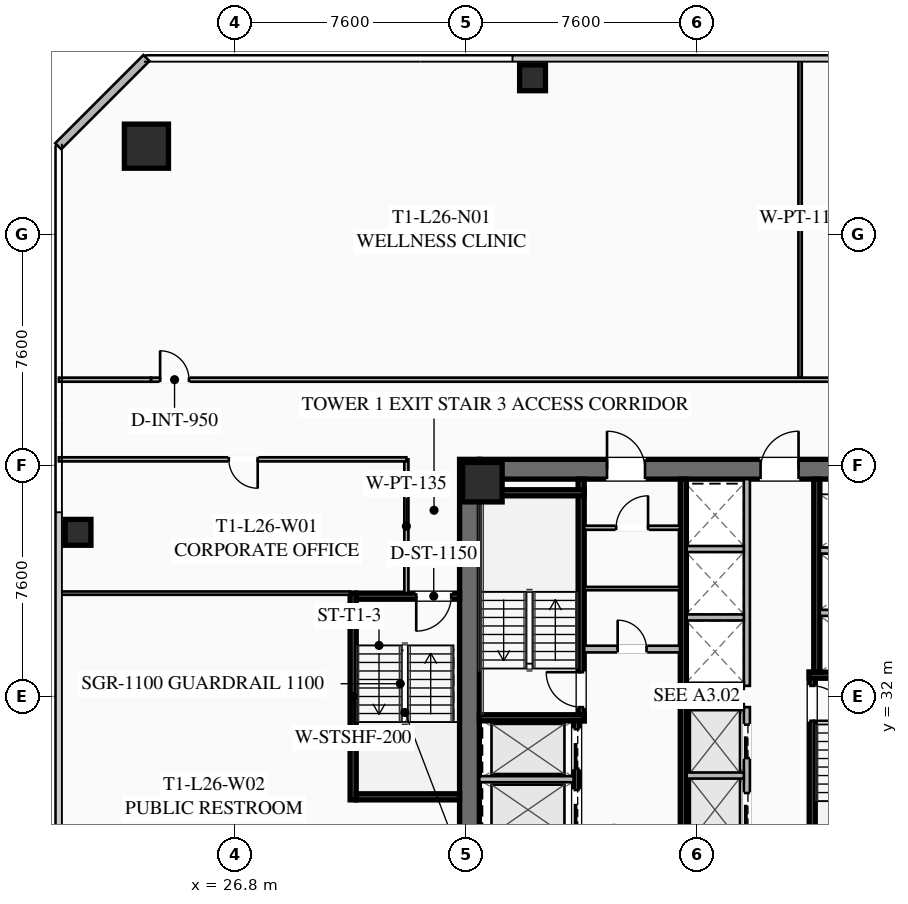
"""IFC4 building model, lengths in metres.
Left out: names, types, materials, properties, quantities, classifications, styles, units other than length and angle.
Written with IfcOpenShell. Run it as: python <this file> out.ifc"""

import sys

from ifc_helpers import new_model, si_unit, direction, frame, frame_2d, origin, origin_2d, place, context, subcontext, project, spatial, rectangle, hollow_rectangle, extrude, element, fill, save


model = new_model("IFC4")
c1 = context("Model", 3, precision=1e-05, world=origin(), true_north=direction((0.0, 1.0)))
c2 = subcontext(c1, "Body", "Model", "MODEL_VIEW")
j1 = project(units=[si_unit("LENGTHUNIT", "METRE"), si_unit("PLANEANGLEUNIT", "RADIAN")], contexts=[c1])
p1 = place(None, origin())
s1 = spatial("IfcSite", under=j1, at=p1, CompositionType="ELEMENT")
p2 = place(p1, origin())
s2 = spatial("IfcBuilding", under=s1, at=p2, CompositionType="ELEMENT")
p3 = place(p2, frame((0.0, 0.0, 99.15)))
s3 = spatial("IfcBuildingStorey", under=s2, at=p3, CompositionType="ELEMENT", Elevation=99.15)
p4 = place(p3, frame((34.525, 24.2, 0.0), z_axis=(0.0, 0.0, 1.0), x_axis=(0.0, 1.0, 0.0)))
e1 = element("IfcWall", 1, at=p4, inside=s3, PredefinedType="SHEAR", context=c2, shape_type="SweptSolid", body=[
    extrude(rectangle(XDim=15.6, YDim=0.65, at=frame_2d((7.8, 0.0))), origin(), (0.0, 0.0, 1.0), 3.55),
])
p5 = place(p3, frame((34.85, 39.475, 0.0), z_axis=(0.0, 0.0, 1.0), x_axis=(1.0, 0.0, 0.0)))
e2 = element("IfcWall", 2, at=p5, inside=s3, PredefinedType="SHEAR", context=c2, shape_type="SweptSolid", body=[
    extrude(rectangle(XDim=14.3, YDim=0.65, at=frame_2d((7.15, 0.0))), origin(), (0.0, 0.0, 1.0), 3.55),
])
p6 = place(p5, frame((4.2, 0.0, 0.0)))
e3 = element("IfcOpeningElement", 3, at=p6, cuts=e2, PredefinedType="OPENING", context=c2, shape_type="SweptSolid", body=[
    extrude(rectangle(XDim=1.25, YDim=2.25, at=frame_2d((0.625, 1.125))), frame((0.0, 0.335, 0.0), z_axis=(0.0, -1.0, 0.0), x_axis=(1.0, 0.0, 0.0)), (0.0, 0.0, 1.0), 0.67),
])
p7 = place(p5, frame((9.25, 0.0, 0.0)))
e4 = element("IfcOpeningElement", 4, at=p7, cuts=e2, PredefinedType="OPENING", context=c2, shape_type="SweptSolid", body=[
    extrude(rectangle(XDim=1.25, YDim=2.25, at=frame_2d((0.625, 1.125))), frame((0.0, 0.335, 0.0), z_axis=(0.0, -1.0, 0.0), x_axis=(1.0, 0.0, 0.0)), (0.0, 0.0, 1.0), 0.67),
])
p8 = place(p3, frame((34.95, 39.05, 0.0), z_axis=(0.0, 0.0, 1.0), x_axis=(1.0, 0.0, 0.0)))
e5 = element("IfcColumn", 5, at=p8, inside=s3, PredefinedType="COLUMN", context=c2, shape_type="SweptSolid", body=[
    extrude(hollow_rectangle(XDim=1.3, YDim=1.3, WallThickness=0.05, at=origin_2d()), origin(), (0.0, 0.0, 1.0), 3.35),
])
p9 = place(p3, frame((23.9, 50.1, 0.0), z_axis=(0.0, 0.0, 1.0), x_axis=(1.0, 0.0, 0.0)))
e6 = element("IfcColumn", 6, at=p9, inside=s3, PredefinedType="COLUMN", context=c2, shape_type="SweptSolid", body=[
    extrude(hollow_rectangle(XDim=1.45, YDim=1.45, WallThickness=0.055, at=origin_2d()), origin(), (0.0, 0.0, 1.0), 3.35),
])
for number, where, z_axis, x_axis in (
    (7, (36.6, 52.35, 0.0), (0.0, 0.0, 1.0), (1.0, 0.0, 0.0)),
    (8, (21.65, 37.4, 0.0), (0.0, 0.0, 1.0), (1.0, 0.0, 0.0)),
):
    element("IfcColumn", number, at=place(p3, frame(where, z_axis=z_axis, x_axis=x_axis)), inside=s3, PredefinedType="COLUMN", context=c2, shape_type="SweptSolid", body=[
        extrude(hollow_rectangle(XDim=0.85, YDim=0.85, WallThickness=0.035, at=origin_2d()), origin(), (0.0, 0.0, 1.0), 3.35),
    ])
p10 = place(p3, frame((21.0, 50.1, 0.0), z_axis=(0.0, 0.0, 1.0), x_axis=(0.707106781187, 0.707106781187, 0.0)))
e9 = element("IfcWall", 9, at=p10, inside=s3, PredefinedType="SOLIDWALL", context=c2, shape_type="SweptSolid", body=[
    extrude(rectangle(XDim=4.101, YDim=0.28, at=frame_2d((2.051, 0.0))), origin(), (0.0, 0.0, 1.0), 3.35),
])
p11 = place(p3, frame((38.2, 31.2, 0.0), z_axis=(0.0, 0.0, 1.0), x_axis=(0.0, 1.0, 0.0)))
e10 = element("IfcWall", 10, at=p11, inside=s3, PredefinedType="SHEAR", context=c2, shape_type="SweptSolid", body=[
    extrude(rectangle(XDim=7.95, YDim=0.2, at=frame_2d((3.975, 0.0))), origin(), (0.0, 0.0, 1.0), 3.35),
])
p12 = place(p11, frame((0.45, 0.0, 0.0)))
e11 = element("IfcOpeningElement", 11, at=p12, cuts=e10, PredefinedType="OPENING", context=c2, shape_type="SweptSolid", body=[
    extrude(rectangle(XDim=1.15, YDim=2.2, at=frame_2d((0.575, 1.1))), frame((0.0, 0.11, 0.0), z_axis=(0.0, -1.0, 0.0), x_axis=(1.0, 0.0, 0.0)), (0.0, 0.0, 1.0), 0.22),
])
for number, where, z_axis, x_axis in (
    (12, (34.85, 31.3, 0.0), (0.0, 0.0, 1.0), (1.0, 0.0, 0.0)),
    (13, (34.85, 38.7, 0.0), (0.0, 0.0, 1.0), (1.0, 0.0, 0.0)),
):
    element("IfcWall", number, at=place(p3, frame(where, z_axis=z_axis, x_axis=x_axis)), inside=s3, PredefinedType="SHEAR", context=c2, shape_type="SweptSolid", body=[
        extrude(rectangle(XDim=3.45, YDim=0.2, at=frame_2d((1.725, 0.0))), origin(), (0.0, 0.0, 1.0), 3.35),
    ])
p13 = place(p3, frame((45.8, 32.8, 0.0), z_axis=(0.0, 0.0, 1.0), x_axis=(0.0, -1.0, 0.0)))
e14 = element("IfcWall", 14, at=p13, inside=s3, PredefinedType="SHEAR", context=c2, shape_type="SweptSolid", body=[
    extrude(rectangle(XDim=7.95, YDim=0.2, at=frame_2d((3.975, 0.0))), origin(), (0.0, 0.0, 1.0), 3.35),
])
p14 = place(p13, frame((0.45, 0.0, 0.0)))
e15 = element("IfcOpeningElement", 15, at=p14, cuts=e14, PredefinedType="OPENING", context=c2, shape_type="SweptSolid", body=[
    extrude(rectangle(XDim=1.15, YDim=2.2, at=frame_2d((0.575, 1.1))), frame((0.0, 0.11, 0.0), z_axis=(0.0, -1.0, 0.0), x_axis=(1.0, 0.0, 0.0)), (0.0, 0.0, 1.0), 0.22),
])
p15 = place(p3, frame((45.7, 32.7, 0.0), z_axis=(0.0, 0.0, 1.0), x_axis=(1.0, 0.0, 0.0)))
e16 = element("IfcWall", 16, at=p15, inside=s3, PredefinedType="SHEAR", context=c2, shape_type="SweptSolid", body=[
    extrude(rectangle(XDim=3.45, YDim=0.2, at=frame_2d((1.725, 0.0))), origin(), (0.0, 0.0, 1.0), 3.35),
])
p16 = place(p3, frame((41.56, 24.85, 0.0), z_axis=(0.0, 0.0, 1.0), x_axis=(0.0, 1.0, 0.0)))
e17 = element("IfcWall", 17, at=p16, inside=s3, PredefinedType="SHEAR", context=c2, shape_type="SweptSolid", body=[
    extrude(rectangle(XDim=14.3, YDim=0.2, at=frame_2d((7.15, 0.0))), origin(), (0.0, 0.0, 1.0), 3.35),
])
p17 = place(p3, frame((38.3, 33.56, 0.0), z_axis=(0.0, 0.0, 1.0), x_axis=(1.0, 0.0, 0.0)))
e18 = element("IfcWall", 18, at=p17, inside=s3, PredefinedType="SOLIDWALL", context=c2, shape_type="SweptSolid", body=[
    extrude(rectangle(XDim=3.15, YDim=0.22, at=frame_2d((1.575, 0.0))), origin(), (0.0, 0.0, 1.0), 2.703),
])
p18 = place(p17, frame((1.1, 0.0, 0.0)))
e19 = element("IfcOpeningElement", 19, at=p18, cuts=e18, PredefinedType="OPENING", context=c2, shape_type="SweptSolid", body=[
    extrude(rectangle(XDim=0.95, YDim=2.05, at=frame_2d((0.475, 1.025))), frame((0.0, 0.12, 0.0), z_axis=(0.0, -1.0, 0.0), x_axis=(1.0, 0.0, 0.0)), (0.0, 0.0, 1.0), 0.24),
])
p19 = place(p3, frame((38.05, 24.85, 0.0), z_axis=(0.0, 0.0, 1.0), x_axis=(0.0, 1.0, 0.0)))
e20 = element("IfcWall", 20, at=p19, inside=s3, PredefinedType="SHEAR", context=c2, shape_type="SweptSolid", body=[
    extrude(rectangle(XDim=6.35, YDim=0.2, at=frame_2d((3.175, 0.0))), origin(), (0.0, 0.0, 1.0), 3.35),
])
p20 = place(p19, frame((4.775, 0.0, 0.0)))
e21 = element("IfcOpeningElement", 21, at=p20, cuts=e20, PredefinedType="OPENING", context=c2, shape_type="SweptSolid", body=[
    extrude(rectangle(XDim=1.3, YDim=2.25, at=frame_2d((0.65, 1.125))), frame((0.0, 0.11, 0.0), z_axis=(0.0, -1.0, 0.0), x_axis=(1.0, 0.0, 0.0)), (0.0, 0.0, 1.0), 0.22),
])
p21 = place(p19, frame((2.775, 0.0, 0.0)))
e22 = element("IfcOpeningElement", 22, at=p21, cuts=e20, PredefinedType="OPENING", context=c2, shape_type="SweptSolid", body=[
    extrude(rectangle(XDim=1.3, YDim=2.25, at=frame_2d((0.65, 1.125))), frame((0.0, 0.11, 0.0), z_axis=(0.0, -1.0, 0.0), x_axis=(1.0, 0.0, 0.0)), (0.0, 0.0, 1.0), 0.22),
])
p22 = place(p19, frame((0.575, 0.0, 0.0)))
e23 = element("IfcOpeningElement", 23, at=p22, cuts=e20, PredefinedType="OPENING", context=c2, shape_type="SweptSolid", body=[
    extrude(rectangle(XDim=1.3, YDim=2.25, at=frame_2d((0.65, 1.125))), frame((0.0, 0.11, 0.0), z_axis=(0.0, -1.0, 0.0), x_axis=(1.0, 0.0, 0.0)), (0.0, 0.0, 1.0), 0.22),
])
p23 = place(p3, frame((34.85, 29.28, 0.0), z_axis=(0.0, 0.0, 1.0), x_axis=(1.0, 0.0, 0.0)))
e24 = element("IfcWall", 24, at=p23, inside=s3, PredefinedType="SOLIDWALL", context=c2, shape_type="SweptSolid", body=[
    extrude(rectangle(XDim=3.1, YDim=0.2, at=frame_2d((1.55, 0.0))), origin(), (0.0, 0.0, 1.0), 3.35),
])
p24 = place(p3, frame((45.95, 39.15, 0.0), z_axis=(0.0, 0.0, 1.0), x_axis=(0.0, -1.0, 0.0)))
e25 = element("IfcWall", 25, at=p24, inside=s3, PredefinedType="SHEAR", context=c2, shape_type="SweptSolid", body=[
    extrude(rectangle(XDim=6.35, YDim=0.2, at=frame_2d((3.175, 0.0))), origin(), (0.0, 0.0, 1.0), 3.35),
])
for number, where, z_axis, x_axis in (
    (26, (46.05, 34.75, 0.0), (0.0, 0.0, 1.0), (1.0, 0.0, 0.0)),
    (27, (46.05, 36.8, 0.0), (0.0, 0.0, 1.0), (1.0, 0.0, 0.0)),
):
    element("IfcWall", number, at=place(p3, frame(where, z_axis=z_axis, x_axis=x_axis)), inside=s3, PredefinedType="SOLIDWALL", context=c2, shape_type="SweptSolid", body=[
        extrude(rectangle(XDim=3.1, YDim=0.2, at=frame_2d((1.55, 0.0))), origin(), (0.0, 0.0, 1.0), 3.35),
    ])
p25 = place(p3, frame((38.3, 37.55, 0.0), z_axis=(0.0, 0.0, 1.0), x_axis=(1.0, 0.0, 0.0)))
e28 = element("IfcWall", 28, at=p25, inside=s3, PredefinedType="PARTITIONING", context=c2, shape_type="SweptSolid", body=[
    extrude(rectangle(XDim=3.15, YDim=0.135, at=frame_2d((1.575, 0.0))), origin(), (0.0, 0.0, 1.0), 2.703),
])
p26 = place(p25, frame((1.05, 0.0, 0.0)))
e29 = element("IfcOpeningElement", 29, at=p26, cuts=e28, PredefinedType="OPENING", context=c2, shape_type="SweptSolid", body=[
    extrude(rectangle(XDim=1.05, YDim=2.2, at=frame_2d((0.525, 1.1))), frame((0.0, 0.077, 0.0), z_axis=(0.0, -1.0, 0.0), x_axis=(1.0, 0.0, 0.0)), (0.0, 0.0, 1.0), 0.155),
])
p27 = place(p3, frame((38.3, 35.55, 0.0), z_axis=(0.0, 0.0, 1.0), x_axis=(1.0, 0.0, 0.0)))
e30 = element("IfcWall", 30, at=p27, inside=s3, PredefinedType="PARTITIONING", context=c2, shape_type="SweptSolid", body=[
    extrude(rectangle(XDim=3.15, YDim=0.11, at=frame_2d((1.575, 0.0))), origin(), (0.0, 0.0, 1.0), 2.703),
])
p28 = place(p3, frame((43.65, 24.85, 0.0), z_axis=(0.0, 0.0, 1.0), x_axis=(0.0, 1.0, 0.0)))
e31 = element("IfcWall", 31, at=p28, inside=s3, PredefinedType="SOLIDWALL", context=c2, shape_type="SweptSolid", body=[
    extrude(rectangle(XDim=6.8, YDim=0.2, at=frame_2d((3.4, 0.0))), origin(), (0.0, 0.0, 1.0), 3.35),
])
p29 = place(p28, frame((0.625, 0.0, 0.0)))
e32 = element("IfcOpeningElement", 32, at=p29, cuts=e31, PredefinedType="OPENING", context=c2, shape_type="SweptSolid", body=[
    extrude(rectangle(XDim=1.1, YDim=2.2, at=frame_2d((0.55, 1.1))), frame((0.0, 0.11, 0.0), z_axis=(0.0, -1.0, 0.0), x_axis=(1.0, 0.0, 0.0)), (0.0, 0.0, 1.0), 0.22),
])
p30 = place(p28, frame((2.875, 0.0, 0.0)))
e33 = element("IfcOpeningElement", 33, at=p30, cuts=e31, PredefinedType="OPENING", context=c2, shape_type="SweptSolid", body=[
    extrude(rectangle(XDim=1.1, YDim=2.2, at=frame_2d((0.55, 1.1))), frame((0.0, 0.11, 0.0), z_axis=(0.0, -1.0, 0.0), x_axis=(1.0, 0.0, 0.0)), (0.0, 0.0, 1.0), 0.22),
])
p31 = place(p28, frame((5.125, 0.0, 0.0)))
e34 = element("IfcOpeningElement", 34, at=p31, cuts=e31, PredefinedType="OPENING", context=c2, shape_type="SweptSolid", body=[
    extrude(rectangle(XDim=1.1, YDim=2.2, at=frame_2d((0.55, 1.1))), frame((0.0, 0.11, 0.0), z_axis=(0.0, -1.0, 0.0), x_axis=(1.0, 0.0, 0.0)), (0.0, 0.0, 1.0), 0.22),
])
for number, where, z_axis, x_axis in (
    (35, (41.67, 29.4, 0.0), (0.0, 0.0, 1.0), (1.0, 0.0, 0.0)),
    (36, (41.67, 31.65, 0.0), (0.0, 0.0, 1.0), (1.0, 0.0, 0.0)),
):
    element("IfcWall", number, at=place(p3, frame(where, z_axis=z_axis, x_axis=x_axis)), inside=s3, PredefinedType="SOLIDWALL", context=c2, shape_type="SweptSolid", body=[
        extrude(rectangle(XDim=1.88, YDim=0.2, at=frame_2d((0.94, 0.0))), origin(), (0.0, 0.0, 1.0), 3.35),
    ])
p32 = place(p3, frame((43.65, 32.35, 0.0), z_axis=(0.0, 0.0, 1.0), x_axis=(0.0, 1.0, 0.0)))
e37 = element("IfcWall", 37, at=p32, inside=s3, PredefinedType="SOLIDWALL", context=c2, shape_type="SweptSolid", body=[
    extrude(rectangle(XDim=6.8, YDim=0.2, at=frame_2d((3.4, 0.0))), origin(), (0.0, 0.0, 1.0), 3.35),
])
for number, where, z_axis, x_axis in (
    (38, (41.67, 32.35, 0.0), (0.0, 0.0, 1.0), (1.0, 0.0, 0.0)),
    (39, (41.67, 34.6, 0.0), (0.0, 0.0, 1.0), (1.0, 0.0, 0.0)),
    (40, (41.67, 36.85, 0.0), (0.0, 0.0, 1.0), (1.0, 0.0, 0.0)),
):
    element("IfcWall", number, at=place(p3, frame(where, z_axis=z_axis, x_axis=x_axis)), inside=s3, PredefinedType="SOLIDWALL", context=c2, shape_type="SweptSolid", body=[
        extrude(rectangle(XDim=1.88, YDim=0.2, at=frame_2d((0.94, 0.0))), origin(), (0.0, 0.0, 1.0), 3.35),
    ])
p33 = place(p3, frame((30.7, 28.6, 0.0), z_axis=(0.0, 0.0, 1.0), x_axis=(0.0, 1.0, 0.0)))
e41 = element("IfcWall", 41, at=p33, inside=s3, PredefinedType="SHEAR", context=c2, shape_type="SweptSolid", body=[
    extrude(rectangle(XDim=6.8, YDim=0.2, at=frame_2d((3.4, 0.0))), origin(), (0.0, 0.0, 1.0), 3.35),
])
p34 = place(p3, frame((34.2, 35.3, 0.0), z_axis=(0.0, 0.0, 1.0), x_axis=(-1.0, 0.0, 0.0)))
e42 = element("IfcWall", 42, at=p34, inside=s3, PredefinedType="SHEAR", context=c2, shape_type="SweptSolid", body=[
    extrude(rectangle(XDim=3.4, YDim=0.2, at=frame_2d((1.7, 0.0))), origin(), (0.0, 0.0, 1.0), 3.35),
])
p35 = place(p34, frame((0.275, 0.0, 0.0)))
e43 = element("IfcOpeningElement", 43, at=p35, cuts=e42, PredefinedType="OPENING", context=c2, shape_type="SweptSolid", body=[
    extrude(rectangle(XDim=1.15, YDim=2.2, at=frame_2d((0.575, 1.1))), frame((0.0, 0.11, 0.0), z_axis=(0.0, -1.0, 0.0), x_axis=(1.0, 0.0, 0.0)), (0.0, 0.0, 1.0), 0.22),
])
p36 = place(p3, frame((30.8, 28.7, 0.0), z_axis=(0.0, 0.0, 1.0), x_axis=(1.0, 0.0, 0.0)))
e44 = element("IfcWall", 44, at=p36, inside=s3, PredefinedType="SHEAR", context=c2, shape_type="SweptSolid", body=[
    extrude(rectangle(XDim=3.4, YDim=0.2, at=frame_2d((1.7, 0.0))), origin(), (0.0, 0.0, 1.0), 3.35),
])
p37 = place(p3, frame((32.45, 35.4, 0.0), z_axis=(0.0, 0.0, 1.0), x_axis=(0.0, 1.0, 0.0)))
e45 = element("IfcWall", 45, at=p37, inside=s3, PredefinedType="PARTITIONING", context=c2, shape_type="SweptSolid", body=[
    extrude(rectangle(XDim=4.4, YDim=0.135, at=frame_2d((2.2, 0.0))), origin(), (0.0, 0.0, 1.0), 2.703),
])
p38 = place(p3, frame((24.05, 42.42, 0.0), z_axis=(0.0, 0.0, 1.0), x_axis=(1.0, 0.0, 0.0)))
e46 = element("IfcWall", 46, at=p38, inside=s3, PredefinedType="PARTITIONING", context=c2, shape_type="SweptSolid", body=[
    extrude(rectangle(XDim=29.1, YDim=0.135, at=frame_2d((14.55, 0.0))), origin(), (0.0, 0.0, 1.0), 2.703),
])
p39 = place(p38, frame((0.3, 0.0, 0.0)))
e47 = element("IfcOpeningElement", 47, at=p39, cuts=e46, PredefinedType="OPENING", context=c2, shape_type="SweptSolid", body=[
    extrude(rectangle(XDim=0.95, YDim=2.05, at=frame_2d((0.475, 1.025))), frame((0.0, 0.077, 0.0), z_axis=(0.0, -1.0, 0.0), x_axis=(1.0, 0.0, 0.0)), (0.0, 0.0, 1.0), 0.155),
])
p40 = place(p38, frame((27.85, 0.0, 0.0)))
e48 = element("IfcOpeningElement", 48, at=p40, cuts=e46, PredefinedType="OPENING", context=c2, shape_type="SweptSolid", body=[
    extrude(rectangle(XDim=0.95, YDim=2.05, at=frame_2d((0.475, 1.025))), frame((0.0, 0.077, 0.0), z_axis=(0.0, -1.0, 0.0), x_axis=(1.0, 0.0, 0.0)), (0.0, 0.0, 1.0), 0.155),
])
p41 = place(p3, frame((21.02, 42.42, 0.0), z_axis=(0.0, 0.0, 1.0), x_axis=(1.0, 0.0, 0.0)))
e49 = element("IfcWall", 49, at=p41, inside=s3, PredefinedType="PARTITIONING", context=c2, shape_type="SweptSolid", body=[
    extrude(rectangle(XDim=3.03, YDim=0.135, at=frame_2d((1.515, 0.0))), origin(), (0.0, 0.0, 1.0), 2.703),
])
p42 = place(p3, frame((45.4, 42.5, 0.0), z_axis=(0.0, 0.0, 1.0), x_axis=(0.0, 1.0, 0.0)))
e50 = element("IfcWall", 50, at=p42, inside=s3, PredefinedType="PARTITIONING", context=c2, shape_type="SweptSolid", body=[
    extrude(rectangle(XDim=10.48, YDim=0.11, at=frame_2d((5.24, 0.0))), origin(), (0.0, 0.0, 1.0), 2.703),
])
p43 = place(p3, frame((32.45, 39.8, 0.0), z_axis=(0.0, 0.0, 1.0), x_axis=(-1.0, 0.0, 0.0)))
e51 = element("IfcWall", 51, at=p43, inside=s3, PredefinedType="PARTITIONING", context=c2, shape_type="SweptSolid", body=[
    extrude(rectangle(XDim=11.43, YDim=0.135, at=frame_2d((5.715, 0.0))), origin(), (0.0, 0.0, 1.0), 2.703),
])
p44 = place(p43, frame((4.89, 0.0, 0.0)))
e52 = element("IfcOpeningElement", 52, at=p44, cuts=e51, PredefinedType="OPENING", context=c2, shape_type="SweptSolid", body=[
    extrude(rectangle(XDim=0.95, YDim=2.05, at=frame_2d((0.475, 1.025))), frame((0.0, 0.077, 0.0), z_axis=(0.0, -1.0, 0.0), x_axis=(1.0, 0.0, 0.0)), (0.0, 0.0, 1.0), 0.155),
])
p45 = place(p3, frame((30.6, 35.4, 0.0), z_axis=(0.0, 0.0, 1.0), x_axis=(-1.0, 0.0, 0.0)))
e53 = element("IfcWall", 53, at=p45, inside=s3, PredefinedType="PARTITIONING", context=c2, shape_type="SweptSolid", body=[
    extrude(rectangle(XDim=9.58, YDim=0.11, at=frame_2d((4.79, 0.0))), origin(), (0.0, 0.0, 1.0), 2.703),
])
p46 = place(p6, origin())
e54 = element("IfcDoor", 54, at=p46, inside=s3, OperationType="SINGLE_SWING_LEFT", PredefinedType="DOOR", context=c2, shape_type="SweptSolid", body=[
    extrude(rectangle(XDim=1.25, YDim=2.25, at=frame_2d((0.625, 1.125))), frame((0.0, 0.025, 0.0), z_axis=(0.0, -1.0, 0.0), x_axis=(1.0, 0.0, 0.0)), (0.0, 0.0, 1.0), 0.05),
])
fill(e3, e54)
p47 = place(p7, origin())
e55 = element("IfcDoor", 55, at=p47, inside=s3, OperationType="SINGLE_SWING_RIGHT", PredefinedType="DOOR", context=c2, shape_type="SweptSolid", body=[
    extrude(rectangle(XDim=1.25, YDim=2.25, at=frame_2d((0.625, 1.125))), frame((0.0, 0.025, 0.0), z_axis=(0.0, -1.0, 0.0), x_axis=(1.0, 0.0, 0.0)), (0.0, 0.0, 1.0), 0.05),
])
fill(e4, e55)
p48 = place(p12, origin())
e56 = element("IfcDoor", 56, at=p48, inside=s3, OperationType="SINGLE_SWING_RIGHT", PredefinedType="DOOR", context=c2, shape_type="SweptSolid", body=[
    extrude(rectangle(XDim=1.15, YDim=2.2, at=frame_2d((0.575, 1.1))), frame((0.0, 0.025, 0.0), z_axis=(0.0, -1.0, 0.0), x_axis=(1.0, 0.0, 0.0)), (0.0, 0.0, 1.0), 0.05),
])
fill(e11, e56)
p49 = place(p14, origin())
e57 = element("IfcDoor", 57, at=p49, inside=s3, OperationType="SINGLE_SWING_RIGHT", PredefinedType="DOOR", context=c2, shape_type="SweptSolid", body=[
    extrude(rectangle(XDim=1.15, YDim=2.2, at=frame_2d((0.575, 1.1))), frame((0.0, 0.025, 0.0), z_axis=(0.0, -1.0, 0.0), x_axis=(1.0, 0.0, 0.0)), (0.0, 0.0, 1.0), 0.05),
])
fill(e15, e57)
p50 = place(p26, origin())
e58 = element("IfcDoor", 58, at=p50, inside=s3, OperationType="SINGLE_SWING_RIGHT", PredefinedType="DOOR", context=c2, shape_type="SweptSolid", body=[
    extrude(rectangle(XDim=1.05, YDim=2.2, at=frame_2d((0.525, 1.1))), frame((0.0, 0.025, 0.0), z_axis=(0.0, -1.0, 0.0), x_axis=(1.0, 0.0, 0.0)), (0.0, 0.0, 1.0), 0.05),
])
fill(e29, e58)
p51 = place(p18, origin())
e59 = element("IfcDoor", 59, at=p51, inside=s3, OperationType="SINGLE_SWING_LEFT", PredefinedType="DOOR", context=c2, shape_type="SweptSolid", body=[
    extrude(rectangle(XDim=0.95, YDim=2.05, at=frame_2d((0.475, 1.025))), frame((0.0, 0.025, 0.0), z_axis=(0.0, -1.0, 0.0), x_axis=(1.0, 0.0, 0.0)), (0.0, 0.0, 1.0), 0.05),
])
fill(e19, e59)
p52 = place(p35, origin())
e60 = element("IfcDoor", 60, at=p52, inside=s3, OperationType="SINGLE_SWING_RIGHT", PredefinedType="DOOR", context=c2, shape_type="SweptSolid", body=[
    extrude(rectangle(XDim=1.15, YDim=2.2, at=frame_2d((0.575, 1.1))), frame((0.0, 0.025, 0.0), z_axis=(0.0, -1.0, 0.0), x_axis=(1.0, 0.0, 0.0)), (0.0, 0.0, 1.0), 0.05),
])
fill(e43, e60)
p53 = place(p39, origin())
e61 = element("IfcDoor", 61, at=p53, inside=s3, OperationType="SINGLE_SWING_LEFT", PredefinedType="DOOR", context=c2, shape_type="SweptSolid", body=[
    extrude(rectangle(XDim=0.95, YDim=2.05, at=frame_2d((0.475, 1.025))), frame((0.0, 0.025, 0.0), z_axis=(0.0, -1.0, 0.0), x_axis=(1.0, 0.0, 0.0)), (0.0, 0.0, 1.0), 0.05),
])
fill(e47, e61)
p54 = place(p44, origin())
e62 = element("IfcDoor", 62, at=p54, inside=s3, OperationType="SINGLE_SWING_LEFT", PredefinedType="DOOR", context=c2, shape_type="SweptSolid", body=[
    extrude(rectangle(XDim=0.95, YDim=2.05, at=frame_2d((0.475, 1.025))), frame((0.0, 0.025, 0.0), z_axis=(0.0, -1.0, 0.0), x_axis=(1.0, 0.0, 0.0)), (0.0, 0.0, 1.0), 0.05),
])
fill(e52, e62)
p55 = place(p20, origin())
e63 = element("IfcDoor", 63, at=p55, inside=s3, OperationType="SLIDING_TO_LEFT", PredefinedType="DOOR", context=c2, shape_type="SweptSolid", body=[
    extrude(rectangle(XDim=1.3, YDim=2.25, at=frame_2d((0.65, 1.125))), frame((0.0, 0.025, 0.0), z_axis=(0.0, -1.0, 0.0), x_axis=(1.0, 0.0, 0.0)), (0.0, 0.0, 1.0), 0.05),
])
fill(e21, e63)
p56 = place(p21, origin())
e64 = element("IfcDoor", 64, at=p56, inside=s3, OperationType="SLIDING_TO_LEFT", PredefinedType="DOOR", context=c2, shape_type="SweptSolid", body=[
    extrude(rectangle(XDim=1.3, YDim=2.25, at=frame_2d((0.65, 1.125))), frame((0.0, 0.025, 0.0), z_axis=(0.0, -1.0, 0.0), x_axis=(1.0, 0.0, 0.0)), (0.0, 0.0, 1.0), 0.05),
])
fill(e22, e64)
p57 = place(p30, origin())
e65 = element("IfcDoor", 65, at=p57, inside=s3, OperationType="SLIDING_TO_LEFT", PredefinedType="DOOR", context=c2, shape_type="SweptSolid", body=[
    extrude(rectangle(XDim=1.1, YDim=2.2, at=frame_2d((0.55, 1.1))), frame((0.0, 0.025, 0.0), z_axis=(0.0, -1.0, 0.0), x_axis=(1.0, 0.0, 0.0)), (0.0, 0.0, 1.0), 0.05),
])
fill(e33, e65)
p58 = place(p31, origin())
e66 = element("IfcDoor", 66, at=p58, inside=s3, OperationType="SLIDING_TO_LEFT", PredefinedType="DOOR", context=c2, shape_type="SweptSolid", body=[
    extrude(rectangle(XDim=1.1, YDim=2.2, at=frame_2d((0.55, 1.1))), frame((0.0, 0.025, 0.0), z_axis=(0.0, -1.0, 0.0), x_axis=(1.0, 0.0, 0.0)), (0.0, 0.0, 1.0), 0.05),
])
fill(e34, e66)
save(model, sys.argv[1])
